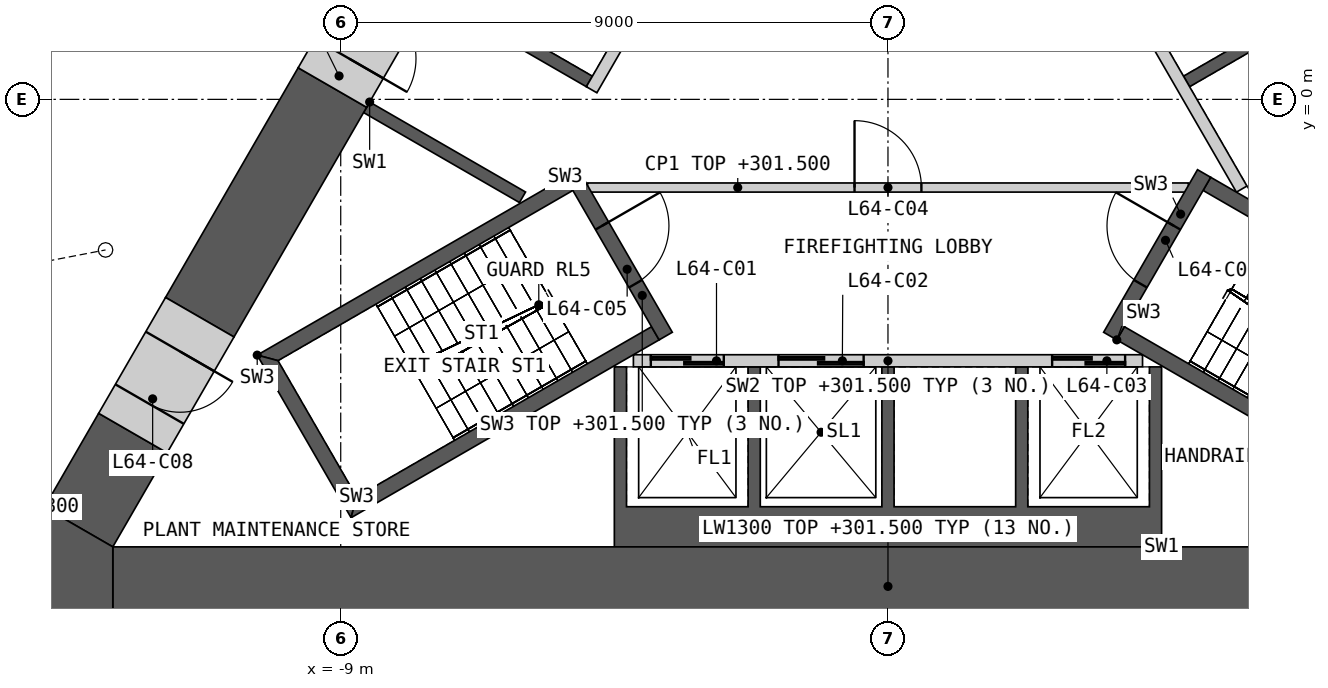
"""IFC4 building model, lengths in metres.
Left out: names, types, materials, properties, quantities, classifications, styles, units other than length and angle.
Written with IfcOpenShell. Run it as: python <this file> out.ifc"""

import sys

from ifc_helpers import new_model, si_unit, direction, frame, frame_2d, origin, origin_2d, place, context, subcontext, project, spatial, polyline, rectangle, i_section, outline, extrude, element, fill, save


model = new_model("IFC4")
c1 = context("Model", 3, precision=1e-05, world=origin(), true_north=direction((0.0, 1.0)))
c2 = subcontext(c1, "Body", "Model", "MODEL_VIEW")
j1 = project(units=[si_unit("LENGTHUNIT", "METRE"), si_unit("PLANEANGLEUNIT", "RADIAN")], contexts=[c1])
p1 = place(None, origin())
s1 = spatial("IfcSite", under=j1, at=p1, CompositionType="ELEMENT")
p2 = place(p1, origin())
s2 = spatial("IfcBuilding", under=s1, at=p2, CompositionType="ELEMENT")
p3 = place(p2, frame((0.0, 0.0, 287.8)))
s3 = spatial("IfcBuildingStorey", under=s2, at=p3, CompositionType="ELEMENT", Elevation=287.8)
p4 = place(p3, frame((-14.368, -2.765, 0.0), z_axis=(0.106510718165, 0.020508167251, 0.99410003621), x_axis=(-0.189072648064, 0.981963102033, 0.0)))
e1 = element("IfcColumn", 1, at=p4, inside=s3, PredefinedType="COLUMN", context=c2, shape_type="SweptSolid", body=[
    extrude(i_section(OverallWidth=0.399, OverallDepth=0.393, WebThickness=0.023, FlangeThickness=0.037, at=origin_2d()), frame((0.0, 0.0, 0.021)), (0.0, 0.0, 1.0), 14.04),
])
p5 = place(p3, origin())
e2 = element("IfcWall", 2, at=p5, inside=s3, PredefinedType="SHEAR", context=c2, shape_type="SweptSolid", body=[
    extrude(outline(polyline([(4.5, -7.36), (-4.5, -7.36), (-4.5, -4.4), (-4.3, -4.4), (-4.3, -6.7), (-2.3, -6.7), (-2.3, -4.4), (-2.1, -4.4), (-2.1, -6.7), (-0.1, -6.7), (-0.1, -4.4), (0.1, -4.4), (0.1, -6.7), (2.1, -6.7), (2.1, -4.4), (2.3, -4.4), (2.3, -6.7), (4.3, -6.7), (4.3, -4.4), (4.5, -4.4), (4.5, -7.36)])), origin(), (0.0, 0.0, 1.0), 13.7),
])
p6 = place(p3, frame((-4.187, -4.3, 0.0), z_axis=(0.0, 0.0, 1.0), x_axis=(1.0, 0.0, 0.0)))
e3 = element("IfcWall", 3, at=p6, inside=s3, PredefinedType="SOLIDWALL", context=c2, shape_type="SweptSolid", body=[
    extrude(rectangle(XDim=8.373, YDim=0.2, at=frame_2d((4.187, 0.0))), origin(), (0.0, 0.0, 1.0), 13.7),
])
p7 = place(p6, frame((0.287, 0.0, 0.0)))
e4 = element("IfcOpeningElement", 4, at=p7, cuts=e3, PredefinedType="OPENING", context=c2, shape_type="SweptSolid", body=[
    extrude(rectangle(XDim=1.2, YDim=2.1, at=frame_2d((0.6, 1.05))), frame((0.0, 0.11, 0.0), z_axis=(0.0, -1.0, 0.0), x_axis=(1.0, 0.0, 0.0)), (0.0, 0.0, 1.0), 0.22),
])
p8 = place(p6, frame((2.387, 0.0, 0.0)))
e5 = element("IfcOpeningElement", 5, at=p8, cuts=e3, PredefinedType="OPENING", context=c2, shape_type="SweptSolid", body=[
    extrude(rectangle(XDim=1.4, YDim=2.1, at=frame_2d((0.7, 1.05))), frame((0.0, 0.11, 0.0), z_axis=(0.0, -1.0, 0.0), x_axis=(1.0, 0.0, 0.0)), (0.0, 0.0, 1.0), 0.22),
])
p9 = place(p6, frame((6.887, 0.0, 0.0)))
e6 = element("IfcOpeningElement", 6, at=p9, cuts=e3, PredefinedType="OPENING", context=c2, shape_type="SweptSolid", body=[
    extrude(rectangle(XDim=1.2, YDim=2.1, at=frame_2d((0.6, 1.05))), frame((0.0, 0.11, 0.0), z_axis=(0.0, -1.0, 0.0), x_axis=(1.0, 0.0, 0.0)), (0.0, 0.0, 1.0), 0.22),
])
p10 = place(p3, origin())
e7 = element("IfcWall", 7, at=p10, inside=s3, PredefinedType="SHEAR", context=c2, shape_type="SweptSolid", body=[
    extrude(outline(polyline([(4.124, 7.577), (8.624, -0.217), (8.231, -0.444), (6.061, -1.697), (5.96, -1.524), (7.952, -0.374), (6.952, 1.358), (4.96, 0.208), (4.861, 0.381), (6.852, 1.531), (5.852, 3.263), (3.861, 2.113), (3.76, 2.287), (5.752, 3.437), (4.752, 5.169), (2.76, 4.019), (2.66, 4.192), (4.652, 5.342), (3.652, 7.074), (1.66, 5.924), (1.561, 6.097), (3.731, 7.35), (4.124, 7.577)])), origin(), (0.0, 0.0, 1.0), 13.7),
])
p11 = place(p3, frame((5.817, -1.476, 0.0), z_axis=(0.0, 0.0, 1.0), x_axis=(-0.500002616675, 0.866023893041, 0.0)))
e8 = element("IfcWall", 8, at=p11, inside=s3, PredefinedType="SOLIDWALL", context=c2, shape_type="SweptSolid", body=[
    extrude(rectangle(XDim=8.373, YDim=0.2, at=frame_2d((4.187, 0.0))), origin(), (0.0, 0.0, 1.0), 13.7),
])
p12 = place(p3, origin())
e9 = element("IfcWall", 9, at=p12, inside=s3, PredefinedType="SHEAR", context=c2, shape_type="SweptSolid", body=[
    extrude(outline(polyline([(-7.524, 1.688), (-4.124, 7.577), (-3.731, 7.35), (-1.561, 6.097), (-1.66, 5.924), (-3.652, 7.074), (-4.652, 5.342), (-2.66, 4.192), (-2.76, 4.019), (-4.752, 5.169), (-5.752, 3.437), (-3.76, 2.287), (-3.861, 2.113), (-5.852, 3.263), (-6.852, 1.531), (-4.861, 0.381), (-4.96, 0.208), (-7.131, 1.461), (-7.524, 1.688)])), origin(), (0.0, 0.0, 1.0), 13.7),
])
p13 = place(p3, origin())
e10 = element("IfcWall", 10, at=p13, inside=s3, PredefinedType="SHEAR", context=c2, shape_type="SweptSolid", body=[
    extrude(outline(polyline([(-8.524, -0.044), (-8.131, -0.271), (-5.96, -1.524), (-6.061, -1.697), (-8.231, -0.444), (-8.624, -0.217), (-8.524, -0.044)])), origin(), (0.0, 0.0, 1.0), 13.7),
])
p14 = place(p3, frame((-1.631, 5.776, 0.0), z_axis=(0.0, 0.0, 1.0), x_axis=(-0.499992876559, -0.866029516466, 0.0)))
e11 = element("IfcWall", 11, at=p14, inside=s3, PredefinedType="SOLIDWALL", context=c2, shape_type="SweptSolid", body=[
    extrude(rectangle(XDim=6.486, YDim=0.2, at=frame_2d((3.243, 0.0))), origin(), (0.0, 0.0, 1.0), 13.7),
])
p15 = place(p3, frame((-4.941, -1.45, 0.0), z_axis=(0.0, 0.0, 1.0), x_axis=(1.0, 0.0, 0.0)))
e12 = element("IfcWall", 12, at=p15, inside=s3, PredefinedType="PARTITIONING", context=c2, shape_type="SweptSolid", body=[
    extrude(rectangle(XDim=9.882, YDim=0.15, at=frame_2d((4.941, 0.0))), origin(), (0.0, 0.0, 1.0), 13.7),
])
p16 = place(p15, frame((4.391, 0.0, 0.0)))
e13 = element("IfcOpeningElement", 13, at=p16, cuts=e12, PredefinedType="OPENING", context=c2, shape_type="SweptSolid", body=[
    extrude(rectangle(XDim=1.1, YDim=2.1, at=frame_2d((0.55, 1.05))), frame((0.0, 0.085, 0.0), z_axis=(0.0, -1.0, 0.0), x_axis=(1.0, 0.0, 0.0)), (0.0, 0.0, 1.0), 0.17),
])
p17 = place(p3, origin())
e14 = element("IfcWall", 14, at=p17, inside=s3, PredefinedType="SHEAR", context=c2, shape_type="SweptSolid", body=[
    extrude(outline(polyline([(-5.307, -1.281), (-10.374, -4.206), (-10.032, -4.298), (-5.182, -1.498), (-5.307, -1.281)])), origin(), (0.0, 0.0, 1.0), 13.7),
])
p18 = place(p3, origin())
e15 = element("IfcWall", 15, at=p18, inside=s3, PredefinedType="SHEAR", context=c2, shape_type="SweptSolid", body=[
    extrude(outline(polyline([(-10.374, -4.206), (-8.83, -6.881), (-8.738, -6.539), (-10.032, -4.298), (-10.374, -4.206)])), origin(), (0.0, 0.0, 1.0), 13.7),
])
p19 = place(p3, origin())
e16 = element("IfcWall", 16, at=p19, inside=s3, PredefinedType="SHEAR", context=c2, shape_type="SweptSolid", body=[
    extrude(outline(polyline([(-8.738, -6.539), (-8.83, -6.881), (-3.763, -3.956), (-3.888, -3.739), (-8.738, -6.539)])), origin(), (0.0, 0.0, 1.0), 13.7),
])
p20 = place(p3, frame((-5.199, -1.219, 0.0), z_axis=(0.0, 0.0, 1.0), x_axis=(0.499982516597, -0.866035497597, 0.0)))
e17 = element("IfcWall", 17, at=p20, inside=s3, PredefinedType="SHEAR", context=c2, shape_type="SweptSolid", body=[
    extrude(rectangle(XDim=3.088, YDim=0.25, at=frame_2d((1.544, 0.0))), origin(), (0.0, 0.0, 1.0), 13.7),
])
p21 = place(p20, frame((0.994, 0.0, 0.0)))
e18 = element("IfcOpeningElement", 18, at=p21, cuts=e17, PredefinedType="OPENING", context=c2, shape_type="SweptSolid", body=[
    extrude(rectangle(XDim=1.1, YDim=2.1, at=frame_2d((0.55, 1.05))), frame((0.0, 0.135, 0.0), z_axis=(0.0, -1.0, 0.0), x_axis=(1.0, 0.0, 0.0)), (0.0, 0.0, 1.0), 0.27),
])
p22 = place(p3, origin())
e19 = element("IfcWall", 19, at=p22, inside=s3, PredefinedType="SHEAR", context=c2, shape_type="SweptSolid", body=[
    extrude(outline(polyline([(3.763, -3.956), (8.83, -6.881), (8.738, -6.539), (3.888, -3.739), (3.763, -3.956)])), origin(), (0.0, 0.0, 1.0), 13.7),
])
p23 = place(p3, origin())
e20 = element("IfcWall", 20, at=p23, inside=s3, PredefinedType="SHEAR", context=c2, shape_type="SweptSolid", body=[
    extrude(outline(polyline([(10.032, -4.298), (10.374, -4.206), (5.307, -1.281), (5.182, -1.498), (10.032, -4.298)])), origin(), (0.0, 0.0, 1.0), 13.7),
])
p24 = place(p3, frame((3.655, -3.893, 0.0), z_axis=(0.0, 0.0, 1.0), x_axis=(0.499982516597, 0.866035497597, 0.0)))
e21 = element("IfcWall", 21, at=p24, inside=s3, PredefinedType="SHEAR", context=c2, shape_type="SweptSolid", body=[
    extrude(rectangle(XDim=3.088, YDim=0.25, at=frame_2d((1.544, 0.0))), origin(), (0.0, 0.0, 1.0), 13.7),
])
p25 = place(p24, frame((0.994, 0.0, 0.0)))
e22 = element("IfcOpeningElement", 22, at=p25, cuts=e21, PredefinedType="OPENING", context=c2, shape_type="SweptSolid", body=[
    extrude(rectangle(XDim=1.1, YDim=2.1, at=frame_2d((0.55, 1.05))), frame((0.0, 0.135, 0.0), z_axis=(0.0, -1.0, 0.0), x_axis=(1.0, 0.0, 0.0)), (0.0, 0.0, 1.0), 0.27),
])
p26 = place(p3, frame((-12.748, -8.01, 0.0), z_axis=(0.0, 0.0, 1.0), x_axis=(1.0, 0.0, 0.0)))
e23 = element("IfcWall", 23, at=p26, inside=s3, PredefinedType="SHEAR", context=c2, shape_type="SweptSolid", body=[
    extrude(rectangle(XDim=25.497, YDim=1.3, at=frame_2d((12.748, 0.0))), origin(), (0.0, 0.0, 1.0), 13.7),
])
p27 = place(p3, frame((10.081, -1.441, 0.0), z_axis=(0.0, 0.0, 1.0), x_axis=(-0.500012180433, 0.866018371294, 0.0)))
e24 = element("IfcWall", 24, at=p27, inside=s3, PredefinedType="SHEAR", context=c2, shape_type="SweptSolid", body=[
    extrude(rectangle(XDim=15.05, YDim=1.3, at=frame_2d((7.525, 0.0))), origin(), (0.0, 0.0, 1.0), 13.7),
])
p28 = place(p3, frame((-9.137, 0.195, 0.0), z_axis=(0.0, 0.0, 1.0), x_axis=(-0.499985697398, -0.866033661238, 0.0)))
e25 = element("IfcWall", 25, at=p28, inside=s3, PredefinedType="SHEAR", context=c2, shape_type="SweptSolid", body=[
    extrude(rectangle(XDim=4.362, YDim=1.3, at=frame_2d((2.181, 0.0))), origin(), (0.0, 0.0, 1.0), 13.7),
])
p29 = place(p3, frame((-12.418, -5.488, 0.0), z_axis=(0.0, 0.0, 1.0), x_axis=(-0.499931460552, -0.866064971437, 0.0)))
e26 = element("IfcWall", 26, at=p29, inside=s3, PredefinedType="SHEAR", context=c2, shape_type="SweptSolid", body=[
    extrude(rectangle(XDim=1.786, YDim=1.3, at=frame_2d((0.893, 0.0))), origin(), (0.0, 0.0, 1.0), 13.7),
])
p30 = place(p3, origin())
e27 = element("IfcWall", 27, at=p30, inside=s3, PredefinedType="SHEAR", context=c2, shape_type="SweptSolid", body=[
    extrude(outline(polyline([(-13.874, -6.71), (-12.748, -7.36), (-12.748, -8.66), (-15.0, -8.66), (-13.874, -6.71)])), origin(), (0.0, 0.0, 1.0), 13.7),
])
p31 = place(p3, frame((-11.318, -3.583, 0.0), z_axis=(0.0, 0.0, 1.0), x_axis=(-0.50002983664, -0.866008176907, 0.0)))
e28 = element("IfcWall", 28, at=p31, inside=s3, PredefinedType="SHEAR", context=c2, shape_type="SweptSolid", body=[
    extrude(rectangle(XDim=2.2, YDim=1.3, at=frame_2d((1.1, 0.0))), origin(), (0.0, 0.0, 1.0), 13.7),
])
p32 = place(p31, frame((0.65, 0.0, 0.0)))
e29 = element("IfcOpeningElement", 29, at=p32, cuts=e28, PredefinedType="OPENING", context=c2, shape_type="SweptSolid", body=[
    extrude(rectangle(XDim=1.0, YDim=2.1, at=frame_2d((0.5, 1.05))), frame((0.0, 0.66, 0.0), z_axis=(0.0, -1.0, 0.0), x_axis=(1.0, 0.0, 0.0)), (0.0, 0.0, 1.0), 1.32),
])
p33 = place(p3, frame((-8.037, 2.1, 0.0), z_axis=(0.0, 0.0, 1.0), x_axis=(-0.50002983664, -0.866008176907, 0.0)))
e30 = element("IfcWall", 30, at=p33, inside=s3, PredefinedType="SHEAR", context=c2, shape_type="SweptSolid", body=[
    extrude(rectangle(XDim=2.2, YDim=1.3, at=frame_2d((1.1, 0.0))), origin(), (0.0, 0.0, 1.0), 13.7),
])
p34 = place(p33, frame((0.55, 0.0, 0.0)))
e31 = element("IfcOpeningElement", 31, at=p34, cuts=e30, PredefinedType="OPENING", context=c2, shape_type="SweptSolid", body=[
    extrude(rectangle(XDim=1.1, YDim=2.1, at=frame_2d((0.55, 1.05))), frame((0.0, 0.66, 0.0), z_axis=(0.0, -1.0, 0.0), x_axis=(1.0, 0.0, 0.0)), (0.0, 0.0, 1.0), 1.32),
])
p35 = place(p3, frame((-18.118, -6.06, 0.0), z_axis=(0.0, 0.0, 1.0), x_axis=(0.49999867524, 0.866026168633, 0.0)))
e32 = element("IfcWall", 32, at=p35, inside=s3, PredefinedType="PARTITIONING", context=c2, shape_type="SweptSolid", body=[
    extrude(rectangle(XDim=28.614, YDim=0.2, at=frame_2d((14.307, 0.0))), origin(), (0.0, 0.0, 1.0), 13.7),
])
p36 = place(p35, frame((1.351, 0.0, 0.0)))
e33 = element("IfcOpeningElement", 33, at=p36, cuts=e32, PredefinedType="OPENING", context=c2, shape_type="SweptSolid", body=[
    extrude(rectangle(XDim=1.2, YDim=2.1, at=frame_2d((0.6, 1.05))), frame((0.0, 0.11, 0.0), z_axis=(0.0, -1.0, 0.0), x_axis=(1.0, 0.0, 0.0)), (0.0, 0.0, 1.0), 0.22),
])
p37 = place(p35, frame((5.953, 0.0, 0.0)))
e34 = element("IfcOpeningElement", 34, at=p37, cuts=e32, PredefinedType="OPENING", context=c2, shape_type="SweptSolid", body=[
    extrude(rectangle(XDim=1.2, YDim=2.1, at=frame_2d((0.6, 1.05))), frame((0.0, 0.11, 0.0), z_axis=(0.0, -1.0, 0.0), x_axis=(1.0, 0.0, 0.0)), (0.0, 0.0, 1.0), 0.22),
])
p38 = place(p35, frame((11.156, 0.0, 0.0)))
e35 = element("IfcOpeningElement", 35, at=p38, cuts=e32, PredefinedType="OPENING", context=c2, shape_type="SweptSolid", body=[
    extrude(rectangle(XDim=1.2, YDim=2.1, at=frame_2d((0.6, 1.05))), frame((0.0, 0.11, 0.0), z_axis=(0.0, -1.0, 0.0), x_axis=(1.0, 0.0, 0.0)), (0.0, 0.0, 1.0), 0.22),
])
p39 = place(p35, frame((16.259, 0.0, 0.0)))
e36 = element("IfcOpeningElement", 36, at=p39, cuts=e32, PredefinedType="OPENING", context=c2, shape_type="SweptSolid", body=[
    extrude(rectangle(XDim=1.2, YDim=2.1, at=frame_2d((0.6, 1.05))), frame((0.0, 0.11, 0.0), z_axis=(0.0, -1.0, 0.0), x_axis=(1.0, 0.0, 0.0)), (0.0, 0.0, 1.0), 0.22),
])
p40 = place(p35, frame((21.461, 0.0, 0.0)))
e37 = element("IfcOpeningElement", 37, at=p40, cuts=e32, PredefinedType="OPENING", context=c2, shape_type="SweptSolid", body=[
    extrude(rectangle(XDim=1.2, YDim=2.1, at=frame_2d((0.6, 1.05))), frame((0.0, 0.11, 0.0), z_axis=(0.0, -1.0, 0.0), x_axis=(1.0, 0.0, 0.0)), (0.0, 0.0, 1.0), 0.22),
])
p41 = place(p35, frame((26.064, 0.0, 0.0)))
e38 = element("IfcOpeningElement", 38, at=p41, cuts=e32, PredefinedType="OPENING", context=c2, shape_type="SweptSolid", body=[
    extrude(rectangle(XDim=1.2, YDim=2.1, at=frame_2d((0.6, 1.05))), frame((0.0, 0.11, 0.0), z_axis=(0.0, -1.0, 0.0), x_axis=(1.0, 0.0, 0.0)), (0.0, 0.0, 1.0), 0.22),
])
p42 = place(p3, frame((3.811, 18.72, 0.0), z_axis=(0.0, 0.0, 1.0), x_axis=(0.49999867524, -0.866026168633, 0.0)))
e39 = element("IfcWall", 39, at=p42, inside=s3, PredefinedType="PARTITIONING", context=c2, shape_type="SweptSolid", body=[
    extrude(rectangle(XDim=28.614, YDim=0.2, at=frame_2d((14.307, 0.0))), origin(), (0.0, 0.0, 1.0), 13.7),
])
p43 = place(p42, frame((26.064, 0.0, 0.0)))
e40 = element("IfcOpeningElement", 40, at=p43, cuts=e39, PredefinedType="OPENING", context=c2, shape_type="SweptSolid", body=[
    extrude(rectangle(XDim=1.2, YDim=2.1, at=frame_2d((0.6, 1.05))), frame((0.0, 0.11, 0.0), z_axis=(0.0, -1.0, 0.0), x_axis=(1.0, 0.0, 0.0)), (0.0, 0.0, 1.0), 0.22),
])
p44 = place(p42, frame((21.461, 0.0, 0.0)))
e41 = element("IfcOpeningElement", 41, at=p44, cuts=e39, PredefinedType="OPENING", context=c2, shape_type="SweptSolid", body=[
    extrude(rectangle(XDim=1.2, YDim=2.1, at=frame_2d((0.6, 1.05))), frame((0.0, 0.11, 0.0), z_axis=(0.0, -1.0, 0.0), x_axis=(1.0, 0.0, 0.0)), (0.0, 0.0, 1.0), 0.22),
])
p45 = place(p42, frame((16.259, 0.0, 0.0)))
e42 = element("IfcOpeningElement", 42, at=p45, cuts=e39, PredefinedType="OPENING", context=c2, shape_type="SweptSolid", body=[
    extrude(rectangle(XDim=1.2, YDim=2.1, at=frame_2d((0.6, 1.05))), frame((0.0, 0.11, 0.0), z_axis=(0.0, -1.0, 0.0), x_axis=(1.0, 0.0, 0.0)), (0.0, 0.0, 1.0), 0.22),
])
p46 = place(p42, frame((11.156, 0.0, 0.0)))
e43 = element("IfcOpeningElement", 43, at=p46, cuts=e39, PredefinedType="OPENING", context=c2, shape_type="SweptSolid", body=[
    extrude(rectangle(XDim=1.2, YDim=2.1, at=frame_2d((0.6, 1.05))), frame((0.0, 0.11, 0.0), z_axis=(0.0, -1.0, 0.0), x_axis=(1.0, 0.0, 0.0)), (0.0, 0.0, 1.0), 0.22),
])
p47 = place(p42, frame((5.953, 0.0, 0.0)))
e44 = element("IfcOpeningElement", 44, at=p47, cuts=e39, PredefinedType="OPENING", context=c2, shape_type="SweptSolid", body=[
    extrude(rectangle(XDim=1.2, YDim=2.1, at=frame_2d((0.6, 1.05))), frame((0.0, 0.11, 0.0), z_axis=(0.0, -1.0, 0.0), x_axis=(1.0, 0.0, 0.0)), (0.0, 0.0, 1.0), 0.22),
])
p48 = place(p42, frame((1.351, 0.0, 0.0)))
e45 = element("IfcOpeningElement", 45, at=p48, cuts=e39, PredefinedType="OPENING", context=c2, shape_type="SweptSolid", body=[
    extrude(rectangle(XDim=1.2, YDim=2.1, at=frame_2d((0.6, 1.05))), frame((0.0, 0.11, 0.0), z_axis=(0.0, -1.0, 0.0), x_axis=(1.0, 0.0, 0.0)), (0.0, 0.0, 1.0), 0.22),
])
p49 = place(p7, origin())
e46 = element("IfcDoor", 46, at=p49, inside=s3, OperationType="SLIDING_TO_LEFT", PredefinedType="DOOR", context=c2, shape_type="SweptSolid", body=[
    extrude(rectangle(XDim=1.2, YDim=2.1, at=frame_2d((0.6, 1.05))), frame((0.0, 0.025, 0.0), z_axis=(0.0, -1.0, 0.0), x_axis=(1.0, 0.0, 0.0)), (0.0, 0.0, 1.0), 0.05),
])
fill(e4, e46)
p50 = place(p8, origin())
e47 = element("IfcDoor", 47, at=p50, inside=s3, OperationType="SLIDING_TO_LEFT", PredefinedType="DOOR", context=c2, shape_type="SweptSolid", body=[
    extrude(rectangle(XDim=1.4, YDim=2.1, at=frame_2d((0.7, 1.05))), frame((0.0, 0.025, 0.0), z_axis=(0.0, -1.0, 0.0), x_axis=(1.0, 0.0, 0.0)), (0.0, 0.0, 1.0), 0.05),
])
fill(e5, e47)
p51 = place(p9, origin())
e48 = element("IfcDoor", 48, at=p51, inside=s3, OperationType="SLIDING_TO_LEFT", PredefinedType="DOOR", context=c2, shape_type="SweptSolid", body=[
    extrude(rectangle(XDim=1.2, YDim=2.1, at=frame_2d((0.6, 1.05))), frame((0.0, 0.025, 0.0), z_axis=(0.0, -1.0, 0.0), x_axis=(1.0, 0.0, 0.0)), (0.0, 0.0, 1.0), 0.05),
])
fill(e6, e48)
p52 = place(p16, origin())
e49 = element("IfcDoor", 49, at=p52, inside=s3, OperationType="SINGLE_SWING_LEFT", PredefinedType="DOOR", context=c2, shape_type="SweptSolid", body=[
    extrude(rectangle(XDim=1.1, YDim=2.1, at=frame_2d((0.55, 1.05))), frame((0.0, 0.025, 0.0), z_axis=(0.0, -1.0, 0.0), x_axis=(1.0, 0.0, 0.0)), (0.0, 0.0, 1.0), 0.05),
])
fill(e13, e49)
p53 = place(p21, origin())
e50 = element("IfcDoor", 50, at=p53, inside=s3, OperationType="SINGLE_SWING_LEFT", PredefinedType="DOOR", context=c2, shape_type="SweptSolid", body=[
    extrude(rectangle(XDim=1.1, YDim=2.1, at=frame_2d((0.55, 1.05))), frame((0.0, 0.025, 0.0), z_axis=(0.0, -1.0, 0.0), x_axis=(1.0, 0.0, 0.0)), (0.0, 0.0, 1.0), 0.05),
])
fill(e18, e50)
p54 = place(p25, origin())
e51 = element("IfcDoor", 51, at=p54, inside=s3, OperationType="SINGLE_SWING_RIGHT", PredefinedType="DOOR", context=c2, shape_type="SweptSolid", body=[
    extrude(rectangle(XDim=1.1, YDim=2.1, at=frame_2d((0.55, 1.05))), frame((0.0, 0.025, 0.0), z_axis=(0.0, -1.0, 0.0), x_axis=(1.0, 0.0, 0.0)), (0.0, 0.0, 1.0), 0.05),
])
fill(e22, e51)
p55 = place(p32, origin())
e52 = element("IfcDoor", 52, at=p55, inside=s3, OperationType="SINGLE_SWING_LEFT", PredefinedType="DOOR", context=c2, shape_type="SweptSolid", body=[
    extrude(rectangle(XDim=1.0, YDim=2.1, at=frame_2d((0.5, 1.05))), frame((0.0, 0.405, 0.0), z_axis=(0.0, -1.0, 0.0), x_axis=(1.0, 0.0, 0.0)), (0.0, 0.0, 1.0), 0.05),
])
fill(e29, e52)
p56 = place(p34, origin())
e53 = element("IfcDoor", 53, at=p56, inside=s3, OperationType="SINGLE_SWING_RIGHT", PredefinedType="DOOR", context=c2, shape_type="SweptSolid", body=[
    extrude(rectangle(XDim=1.1, YDim=2.1, at=frame_2d((0.55, 1.05))), frame((0.0, 0.405, 0.0), z_axis=(0.0, -1.0, 0.0), x_axis=(1.0, 0.0, 0.0)), (0.0, 0.0, 1.0), 0.05),
])
fill(e31, e53)
save(model, sys.argv[1])
